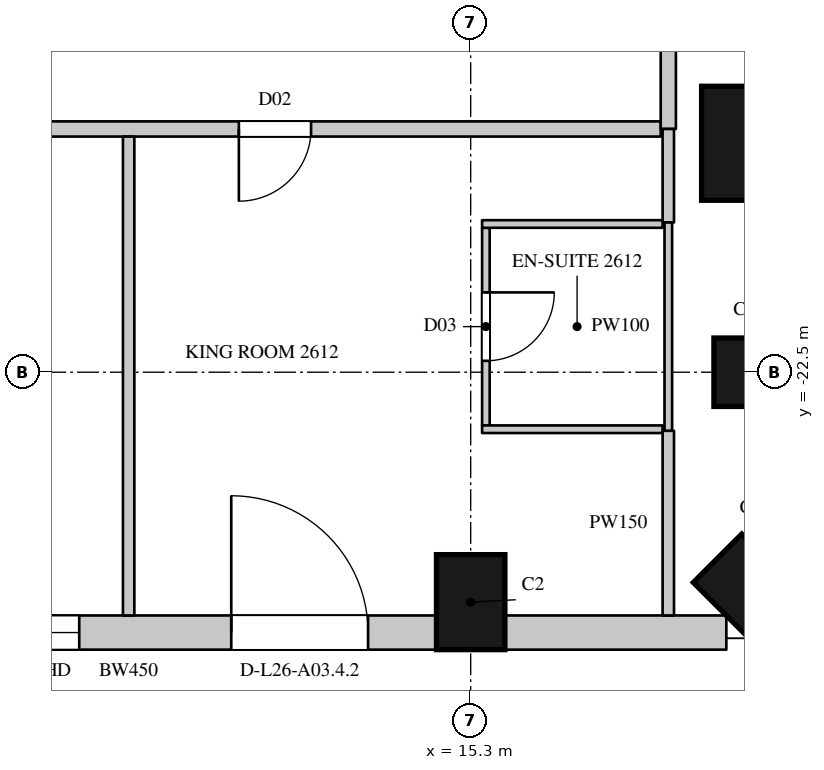
"""IFC4 building model, lengths in metres.
Left out: names, types, materials, properties, quantities, classifications, styles, units other than length and angle.
Written with IfcOpenShell. Run it as: python <this file> out.ifc"""

import sys

from ifc_helpers import new_model, si_unit, direction, frame, frame_2d, origin, origin_2d, place, context, subcontext, project, spatial, rectangle, circle, extrude, element, fill, save


model = new_model("IFC4")
c1 = context("Model", 3, precision=1e-05, world=origin(), true_north=direction((0.0, 1.0)))
c2 = subcontext(c1, "Body", "Model", "MODEL_VIEW")
j1 = project(units=[si_unit("LENGTHUNIT", "METRE"), si_unit("PLANEANGLEUNIT", "RADIAN")], contexts=[c1])
p1 = place(None, origin())
s1 = spatial("IfcSite", under=j1, at=p1, CompositionType="ELEMENT")
p2 = place(p1, origin())
s2 = spatial("IfcBuilding", under=s1, at=p2, CompositionType="ELEMENT")
p3 = place(p2, frame((0.0, 0.0, 123.9)))
s3 = spatial("IfcBuildingStorey", under=s2, at=p3, CompositionType="ELEMENT", Elevation=123.9)
for number, where, z_axis, x_axis in (
    (1, (15.3, -25.525, 0.0), (0.0, 0.0, 1.0), (1.0, 0.0, 0.0)),
    (2, (18.99, -25.39, 0.0), (0.0, 0.0, 1.0), (0.707, 0.707, 0.0)),
    (3, (19.125, -22.5, 0.0), (0.0, 0.0, 1.0), (0.0, 1.0, 0.0)),
):
    element("IfcColumn", number, at=place(p3, frame(where, z_axis=z_axis, x_axis=x_axis)), inside=s3, PredefinedType="COLUMN", context=c2, shape_type="SweptSolid", body=[
        extrude(rectangle(XDim=0.9, YDim=1.25, at=origin_2d()), origin(), (0.0, 0.0, 1.0), 3.6),
    ])
p4 = place(p3, frame((19.088, -19.488, 0.0), z_axis=(0.0, 0.0, 1.0), x_axis=(1.0, 0.0, 0.0)))
e4 = element("IfcColumn", 4, at=p4, inside=s3, PredefinedType="COLUMN", context=c2, shape_type="SweptSolid", body=[
    extrude(circle(Radius=0.75, at=origin_2d()), origin(), (0.0, 0.0, 1.0), 3.6),
])
p5 = place(p3, frame((6.75, -25.925, 0.0), z_axis=(0.0, 0.0, 1.0), x_axis=(1.0, 0.0, 0.0)))
e5 = element("IfcWall", 5, at=p5, inside=s3, PredefinedType="SOLIDWALL", context=c2, shape_type="SweptSolid", body=[
    extrude(rectangle(XDim=8.1, YDim=0.45, at=frame_2d((4.05, 0.0))), origin(), (0.0, 0.0, 1.0), 3.3),
])
p6 = place(p5, frame((0.2, 0.0, 0.0)))
e6 = element("IfcOpeningElement", 6, at=p6, cuts=e5, PredefinedType="OPENING", context=c2, shape_type="SweptSolid", body=[
    extrude(rectangle(XDim=1.8, YDim=2.4, at=frame_2d((0.9, 1.2))), frame((0.0, 0.235, 0.0), z_axis=(0.0, -1.0, 0.0), x_axis=(1.0, 0.0, 0.0)), (0.0, 0.0, 1.0), 0.47),
])
p7 = place(p5, frame((2.2, 0.0, 1.05)))
e7 = element("IfcOpeningElement", 7, at=p7, cuts=e5, PredefinedType="OPENING", context=c2, shape_type="SweptSolid", body=[
    extrude(rectangle(XDim=1.2, YDim=2.0, at=frame_2d((0.6, 1.0))), frame((0.0, 0.235, 0.0), z_axis=(0.0, -1.0, 0.0), x_axis=(1.0, 0.0, 0.0)), (0.0, 0.0, 1.0), 0.47),
])
p8 = place(p5, frame((5.4, 0.0, 0.0)))
e8 = element("IfcOpeningElement", 8, at=p8, cuts=e5, PredefinedType="OPENING", context=c2, shape_type="SweptSolid", body=[
    extrude(rectangle(XDim=1.8, YDim=2.4, at=frame_2d((0.9, 1.2))), frame((0.0, 0.235, 0.0), z_axis=(0.0, -1.0, 0.0), x_axis=(1.0, 0.0, 0.0)), (0.0, 0.0, 1.0), 0.47),
])
p9 = place(p3, frame((15.75, -25.925, 0.0), z_axis=(0.0, 0.0, 1.0), x_axis=(1.0, 0.0, 0.0)))
e9 = element("IfcWall", 9, at=p9, inside=s3, PredefinedType="SOLIDWALL", context=c2, shape_type="SweptSolid", body=[
    extrude(rectangle(XDim=2.914, YDim=0.45, at=frame_2d((1.457, 0.0))), origin(), (0.0, 0.0, 1.0), 3.3),
])
p10 = place(p3, frame((-20.8, -19.3, 0.0), z_axis=(0.0, 0.0, 1.0), x_axis=(1.0, 0.0, 0.0)))
e10 = element("IfcWall", 10, at=p10, inside=s3, PredefinedType="PARTITIONING", context=c2, shape_type="SweptSolid", body=[
    extrude(rectangle(XDim=38.6, YDim=0.2, at=frame_2d((19.3, 0.0))), origin(), (0.0, 0.0, 1.0), 3.3),
])
p11 = place(p10, frame((11.2, 0.0, 0.0)))
e11 = element("IfcOpeningElement", 11, at=p11, cuts=e10, PredefinedType="OPENING", context=c2, shape_type="SweptSolid", body=[
    extrude(rectangle(XDim=0.95, YDim=2.2, at=frame_2d((0.475, 1.1))), frame((0.0, 0.11, 0.0), z_axis=(0.0, -1.0, 0.0), x_axis=(1.0, 0.0, 0.0)), (0.0, 0.0, 1.0), 0.22),
])
p12 = place(p10, frame((15.05, 0.0, 0.0)))
e12 = element("IfcOpeningElement", 12, at=p12, cuts=e10, PredefinedType="OPENING", context=c2, shape_type="SweptSolid", body=[
    extrude(rectangle(XDim=0.95, YDim=2.2, at=frame_2d((0.475, 1.1))), frame((0.0, 0.11, 0.0), z_axis=(0.0, -1.0, 0.0), x_axis=(1.0, 0.0, 0.0)), (0.0, 0.0, 1.0), 0.22),
])
p13 = place(p10, frame((29.2, 0.0, 0.0)))
e13 = element("IfcOpeningElement", 13, at=p13, cuts=e10, PredefinedType="OPENING", context=c2, shape_type="SweptSolid", body=[
    extrude(rectangle(XDim=0.95, YDim=2.2, at=frame_2d((0.475, 1.1))), frame((0.0, 0.11, 0.0), z_axis=(0.0, -1.0, 0.0), x_axis=(1.0, 0.0, 0.0)), (0.0, 0.0, 1.0), 0.22),
])
p14 = place(p10, frame((33.05, 0.0, 0.0)))
e14 = element("IfcOpeningElement", 14, at=p14, cuts=e10, PredefinedType="OPENING", context=c2, shape_type="SweptSolid", body=[
    extrude(rectangle(XDim=0.95, YDim=2.2, at=frame_2d((0.475, 1.1))), frame((0.0, 0.11, 0.0), z_axis=(0.0, -1.0, 0.0), x_axis=(1.0, 0.0, 0.0)), (0.0, 0.0, 1.0), 0.22),
])
p15 = place(p3, frame((17.9, -19.3, 0.0), z_axis=(0.0, 0.0, 1.0), x_axis=(0.0, 1.0, 0.0)))
e15 = element("IfcWall", 15, at=p15, inside=s3, PredefinedType="PARTITIONING", context=c2, shape_type="SweptSolid", body=[
    extrude(rectangle(XDim=14.55, YDim=0.2, at=frame_2d((7.275, 0.0))), origin(), (0.0, 0.0, 1.0), 3.3),
])
p16 = place(p15, frame((3.7, 0.0, 0.0)))
e16 = element("IfcOpeningElement", 16, at=p16, cuts=e15, PredefinedType="OPENING", context=c2, shape_type="SweptSolid", body=[
    extrude(rectangle(XDim=0.95, YDim=2.2, at=frame_2d((0.475, 1.1))), frame((0.0, 0.11, 0.0), z_axis=(0.0, -1.0, 0.0), x_axis=(1.0, 0.0, 0.0)), (0.0, 0.0, 1.0), 0.22),
])
p17 = place(p15, frame((13.2, 0.0, 0.0)))
e17 = element("IfcOpeningElement", 17, at=p17, cuts=e15, PredefinedType="OPENING", context=c2, shape_type="SweptSolid", body=[
    extrude(rectangle(XDim=0.95, YDim=2.2, at=frame_2d((0.475, 1.1))), frame((0.0, 0.11, 0.0), z_axis=(0.0, -1.0, 0.0), x_axis=(1.0, 0.0, 0.0)), (0.0, 0.0, 1.0), 0.22),
])
p18 = place(p3, frame((10.8, -25.7, 0.0), z_axis=(0.0, 0.0, 1.0), x_axis=(0.0, 1.0, 0.0)))
e18 = element("IfcWall", 18, at=p18, inside=s3, PredefinedType="PARTITIONING", context=c2, shape_type="SweptSolid", body=[
    extrude(rectangle(XDim=6.3, YDim=0.15, at=frame_2d((3.15, 0.0))), origin(), (0.0, 0.0, 1.0), 2.65),
])
p19 = place(p3, frame((17.9, -25.7, 0.0), z_axis=(0.0, 0.0, 1.0), x_axis=(0.0, 1.0, 0.0)))
e19 = element("IfcWall", 19, at=p19, inside=s3, PredefinedType="PARTITIONING", context=c2, shape_type="SweptSolid", body=[
    extrude(rectangle(XDim=2.43, YDim=0.15, at=frame_2d((1.215, 0.0))), origin(), (0.0, 0.0, 1.0), 3.3),
])
p20 = place(p3, frame((17.9, -20.53, 0.0), z_axis=(0.0, 0.0, 1.0), x_axis=(0.0, 1.0, 0.0)))
e20 = element("IfcWall", 20, at=p20, inside=s3, PredefinedType="PARTITIONING", context=c2, shape_type="SweptSolid", body=[
    extrude(rectangle(XDim=1.23, YDim=0.15, at=frame_2d((0.615, 0.0))), origin(), (0.0, 0.0, 1.0), 3.3),
])
p21 = place(p3, frame((15.5, -23.2, 0.0), z_axis=(0.0, 0.0, 1.0), x_axis=(0.0, 1.0, 0.0)))
e21 = element("IfcWall", 21, at=p21, inside=s3, PredefinedType="PARTITIONING", context=c2, shape_type="SweptSolid", body=[
    extrude(rectangle(XDim=2.6, YDim=0.1, at=frame_2d((1.3, 0.0))), origin(), (0.0, 0.0, 1.0), 2.75),
])
p22 = place(p21, frame((0.85, 0.0, 0.0)))
e22 = element("IfcOpeningElement", 22, at=p22, cuts=e21, PredefinedType="OPENING", context=c2, shape_type="SweptSolid", body=[
    extrude(rectangle(XDim=0.9, YDim=2.2, at=frame_2d((0.45, 1.1))), frame((0.0, 0.06, 0.0), z_axis=(0.0, -1.0, 0.0), x_axis=(1.0, 0.0, 0.0)), (0.0, 0.0, 1.0), 0.12),
])
for number, where, z_axis, x_axis in (
    (23, (15.45, -23.25, 0.0), (0.0, 0.0, 1.0), (1.0, 0.0, 0.0)),
    (24, (15.45, -20.55, 0.0), (0.0, 0.0, 1.0), (1.0, 0.0, 0.0)),
):
    element("IfcWall", number, at=place(p3, frame(where, z_axis=z_axis, x_axis=x_axis)), inside=s3, PredefinedType="PARTITIONING", context=c2, shape_type="SweptSolid", body=[
        extrude(rectangle(XDim=2.375, YDim=0.1, at=frame_2d((1.188, 0.0))), origin(), (0.0, 0.0, 1.0), 3.3),
    ])
p23 = place(p3, frame((17.9, -23.27, 0.0), z_axis=(0.0, 0.0, 1.0), x_axis=(0.0, 1.0, 0.0)))
e25 = element("IfcWall", 25, at=p23, inside=s3, PredefinedType="PARTITIONING", context=c2, shape_type="SweptSolid", body=[
    extrude(rectangle(XDim=2.74, YDim=0.1, at=frame_2d((1.37, 0.0))), origin(), (0.0, 0.0, 1.0), 3.3),
])
p24 = place(p7, origin())
e26 = element("IfcWindow", 26, at=p24, inside=s3, PartitioningType="SINGLE_PANEL", PredefinedType="WINDOW", context=c2, shape_type="SweptSolid", body=[
    extrude(rectangle(XDim=1.2, YDim=2.0, at=frame_2d((0.6, 1.0))), frame((0.0, 0.135, 0.0), z_axis=(0.0, -1.0, 0.0), x_axis=(1.0, 0.0, 0.0)), (0.0, 0.0, 1.0), 0.06),
])
fill(e7, e26)
p25 = place(p8, origin())
e27 = element("IfcDoor", 27, at=p25, inside=s3, OperationType="SLIDING_TO_LEFT", PredefinedType="DOOR", context=c2, shape_type="SweptSolid", body=[
    extrude(rectangle(XDim=1.8, YDim=2.4, at=frame_2d((0.9, 1.2))), frame((0.0, 0.13, 0.0), z_axis=(0.0, -1.0, 0.0), x_axis=(1.0, 0.0, 0.0)), (0.0, 0.0, 1.0), 0.05),
])
fill(e8, e27)
p26 = place(p14, origin())
e28 = element("IfcDoor", 28, at=p26, inside=s3, OperationType="SINGLE_SWING_RIGHT", PredefinedType="DOOR", context=c2, shape_type="SweptSolid", body=[
    extrude(rectangle(XDim=0.95, YDim=2.2, at=frame_2d((0.475, 1.1))), frame((0.0, 0.025, 0.0), z_axis=(0.0, -1.0, 0.0), x_axis=(1.0, 0.0, 0.0)), (0.0, 0.0, 1.0), 0.05),
])
fill(e14, e28)
p27 = place(p22, origin())
e29 = element("IfcDoor", 29, at=p27, inside=s3, OperationType="SINGLE_SWING_LEFT", PredefinedType="DOOR", context=c2, shape_type="SweptSolid", body=[
    extrude(rectangle(XDim=0.9, YDim=2.2, at=frame_2d((0.45, 1.1))), frame((0.0, 0.025, 0.0), z_axis=(0.0, -1.0, 0.0), x_axis=(1.0, 0.0, 0.0)), (0.0, 0.0, 1.0), 0.05),
])
fill(e22, e29)
save(model, sys.argv[1])
